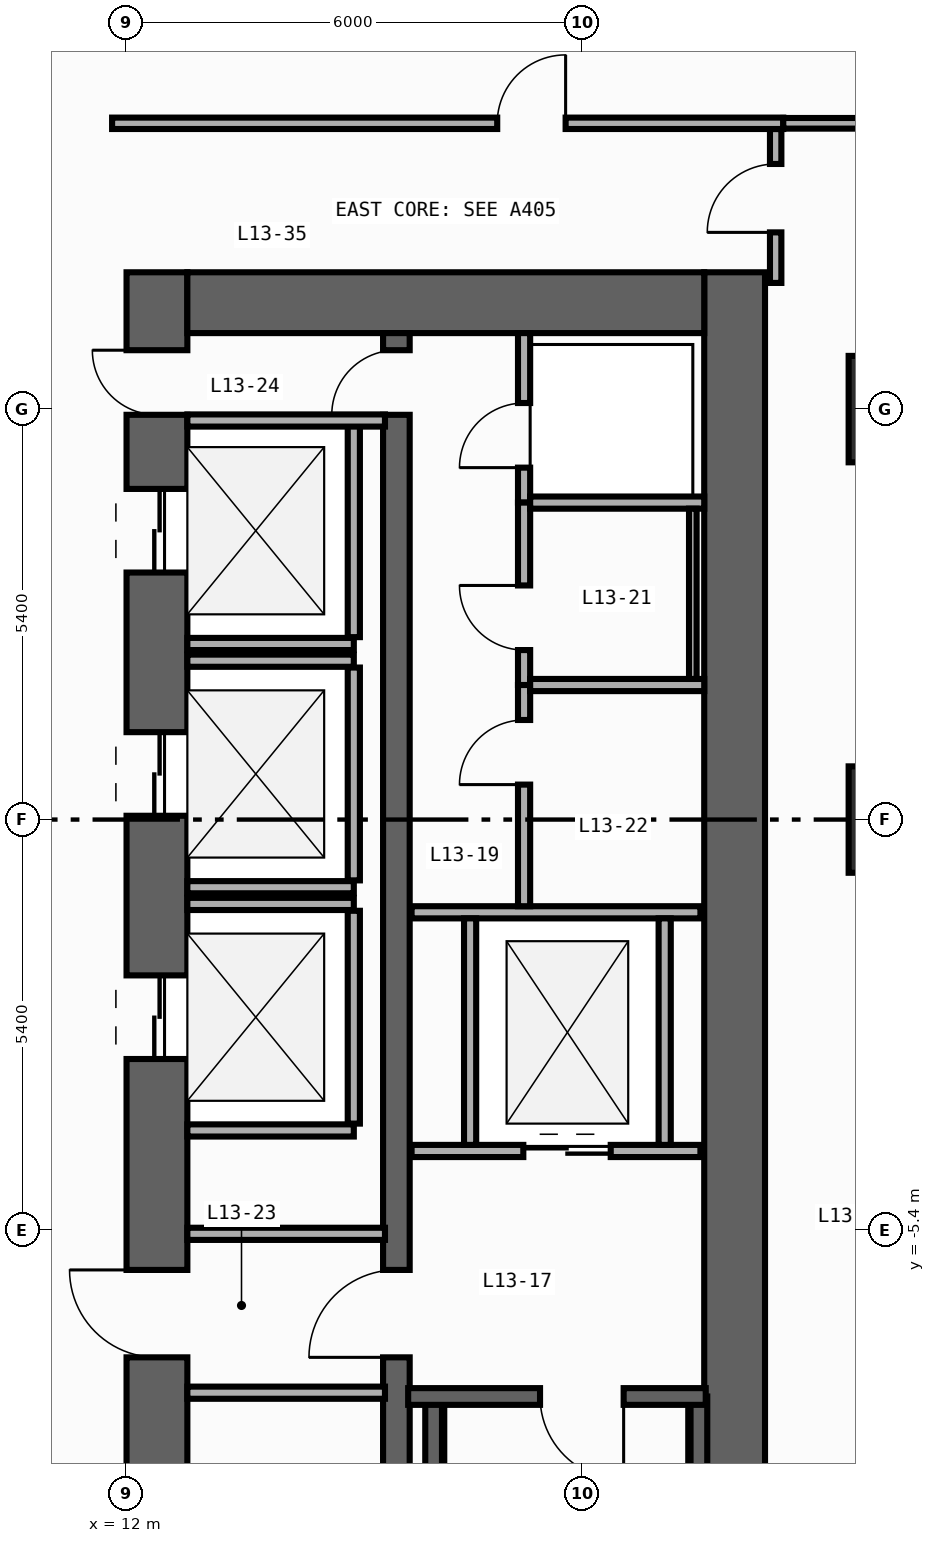
"""IFC4 building model, lengths in metres.
Left out: names, types, materials, properties, quantities, classifications, styles, units other than length and angle.
Written with IfcOpenShell. Run it as: python <this file> out.ifc"""

import sys

from ifc_helpers import new_model, si_unit, direction, frame, frame_2d, origin, origin_2d, place, context, subcontext, project, spatial, rectangle, extrude, element, fill, save


model = new_model("IFC4")
c1 = context("Model", 3, precision=1e-05, world=origin(), true_north=direction((0.0, 1.0)))
c2 = subcontext(c1, "Body", "Model", "MODEL_VIEW")
j1 = project(units=[si_unit("LENGTHUNIT", "METRE"), si_unit("PLANEANGLEUNIT", "RADIAN")], contexts=[c1])
p1 = place(None, origin())
s1 = spatial("IfcSite", under=j1, at=p1, CompositionType="ELEMENT")
p2 = place(p1, origin())
s2 = spatial("IfcBuilding", under=s1, at=p2, CompositionType="ELEMENT")
p3 = place(p2, frame((0.0, 0.0, 55.4)))
s3 = spatial("IfcBuildingStorey", under=s2, at=p3, CompositionType="ELEMENT", Elevation=55.4)
p4 = place(p3, frame((12.4, -19.8, 0.0), z_axis=(0.0, 0.0, 1.0), x_axis=(0.0, 1.0, 0.0)))
e1 = element("IfcWall", 1, at=p4, inside=s3, PredefinedType="SHEAR", context=c2, shape_type="SweptSolid", body=[
    extrude(rectangle(XDim=27.0, YDim=0.8, at=frame_2d((13.5, 0.0))), origin(), (0.0, 0.0, 1.0), 3.94),
])
p5 = place(p4, frame((23.05, 0.0, 0.0)))
e2 = element("IfcOpeningElement", 2, at=p5, cuts=e1, PredefinedType="OPENING", context=c2, shape_type="SweptSolid", body=[
    extrude(rectangle(XDim=1.1, YDim=2.2, at=frame_2d((0.55, 1.1))), frame((0.0, 0.41, 0.0), z_axis=(0.0, -1.0, 0.0), x_axis=(1.0, 0.0, 0.0)), (0.0, 0.0, 1.0), 0.82),
])
p6 = place(p4, frame((19.85, 0.0, 0.0)))
e3 = element("IfcOpeningElement", 3, at=p6, cuts=e1, PredefinedType="OPENING", context=c2, shape_type="SweptSolid", body=[
    extrude(rectangle(XDim=1.1, YDim=2.2, at=frame_2d((0.55, 1.1))), frame((0.0, 0.41, 0.0), z_axis=(0.0, -1.0, 0.0), x_axis=(1.0, 0.0, 0.0)), (0.0, 0.0, 1.0), 0.82),
])
p7 = place(p4, frame((16.65, 0.0, 0.0)))
e4 = element("IfcOpeningElement", 4, at=p7, cuts=e1, PredefinedType="OPENING", context=c2, shape_type="SweptSolid", body=[
    extrude(rectangle(XDim=1.1, YDim=2.2, at=frame_2d((0.55, 1.1))), frame((0.0, 0.41, 0.0), z_axis=(0.0, -1.0, 0.0), x_axis=(1.0, 0.0, 0.0)), (0.0, 0.0, 1.0), 0.82),
])
p8 = place(p4, frame((10.175, 0.0, 0.0)))
e5 = element("IfcOpeningElement", 5, at=p8, cuts=e1, PredefinedType="OPENING", context=c2, shape_type="SweptSolid", body=[
    extrude(rectangle(XDim=0.85, YDim=2.1, at=frame_2d((0.425, 1.05))), frame((0.0, 0.41, 0.0), z_axis=(0.0, -1.0, 0.0), x_axis=(1.0, 0.0, 0.0)), (0.0, 0.0, 1.0), 0.82),
])
p9 = place(p4, frame((12.725, 0.0, 0.0)))
e6 = element("IfcOpeningElement", 6, at=p9, cuts=e1, PredefinedType="OPENING", context=c2, shape_type="SweptSolid", body=[
    extrude(rectangle(XDim=1.15, YDim=2.2, at=frame_2d((0.575, 1.1))), frame((0.0, 0.41, 0.0), z_axis=(0.0, -1.0, 0.0), x_axis=(1.0, 0.0, 0.0)), (0.0, 0.0, 1.0), 0.82),
])
p10 = place(p4, frame((25.125, 0.0, 0.0)))
e7 = element("IfcOpeningElement", 7, at=p10, cuts=e1, PredefinedType="OPENING", context=c2, shape_type="SweptSolid", body=[
    extrude(rectangle(XDim=0.85, YDim=2.1, at=frame_2d((0.425, 1.05))), frame((0.0, 0.41, 0.0), z_axis=(0.0, -1.0, 0.0), x_axis=(1.0, 0.0, 0.0)), (0.0, 0.0, 1.0), 0.82),
])
p11 = place(p3, frame((20.0, -19.8, 0.0), z_axis=(0.0, 0.0, 1.0), x_axis=(0.0, 1.0, 0.0)))
e8 = element("IfcWall", 8, at=p11, inside=s3, PredefinedType="SHEAR", context=c2, shape_type="SweptSolid", body=[
    extrude(rectangle(XDim=27.0, YDim=0.8, at=frame_2d((13.5, 0.0))), origin(), (0.0, 0.0, 1.0), 3.94),
])
p12 = place(p3, frame((12.8, 6.8, 0.0), z_axis=(0.0, 0.0, 1.0), x_axis=(1.0, 0.0, 0.0)))
e9 = element("IfcWall", 9, at=p12, inside=s3, PredefinedType="SHEAR", context=c2, shape_type="SweptSolid", body=[
    extrude(rectangle(XDim=6.8, YDim=0.8, at=frame_2d((3.4, 0.0))), origin(), (0.0, 0.0, 1.0), 3.94),
])
p13 = place(p3, frame((15.55, -19.0, 0.0), z_axis=(0.0, 0.0, 1.0), x_axis=(0.0, 1.0, 0.0)))
e10 = element("IfcWall", 10, at=p13, inside=s3, PredefinedType="SHEAR", context=c2, shape_type="SweptSolid", body=[
    extrude(rectangle(XDim=25.4, YDim=0.35, at=frame_2d((12.7, 0.0))), origin(), (0.0, 0.0, 1.0), 3.94),
])
p14 = place(p13, frame((11.925, 0.0, 0.0)))
e11 = element("IfcOpeningElement", 11, at=p14, cuts=e10, PredefinedType="OPENING", context=c2, shape_type="SweptSolid", body=[
    extrude(rectangle(XDim=1.15, YDim=2.2, at=frame_2d((0.575, 1.1))), frame((0.0, 0.185, 0.0), z_axis=(0.0, -1.0, 0.0), x_axis=(1.0, 0.0, 0.0)), (0.0, 0.0, 1.0), 0.37),
])
p15 = place(p13, frame((24.325, 0.0, 0.0)))
e12 = element("IfcOpeningElement", 12, at=p15, cuts=e10, PredefinedType="OPENING", context=c2, shape_type="SweptSolid", body=[
    extrude(rectangle(XDim=0.85, YDim=2.1, at=frame_2d((0.425, 1.05))), frame((0.0, 0.185, 0.0), z_axis=(0.0, -1.0, 0.0), x_axis=(1.0, 0.0, 0.0)), (0.0, 0.0, 1.0), 0.37),
])
for number, where, z_axis, x_axis in (
    (13, (16.04, -18.89, 0.0), (0.0, 0.0, 1.0), (0.0, 1.0, 0.0)),
    (14, (19.53, -18.89, 0.0), (0.0, 0.0, 1.0), (0.0, 1.0, 0.0)),
):
    element("IfcWall", number, at=place(p3, frame(where, z_axis=z_axis, x_axis=x_axis)), inside=s3, PredefinedType="SHEAR", context=c2, shape_type="SweptSolid", body=[
        extrude(rectangle(XDim=11.3, YDim=0.22, at=frame_2d((5.65, 0.0))), origin(), (0.0, 0.0, 1.0), 3.94),
    ])
p16 = place(p3, frame((19.62, -7.59, 0.0), z_axis=(0.0, 0.0, 1.0), x_axis=(-1.0, 0.0, 0.0)))
e15 = element("IfcWall", 15, at=p16, inside=s3, PredefinedType="SHEAR", context=c2, shape_type="SweptSolid", body=[
    extrude(rectangle(XDim=3.915, YDim=0.22, at=frame_2d((1.958, 0.0))), origin(), (0.0, 0.0, 1.0), 3.94),
])
p17 = place(p16, frame((1.08, 0.0, 0.0)))
e16 = element("IfcOpeningElement", 16, at=p17, cuts=e15, PredefinedType="OPENING", context=c2, shape_type="SweptSolid", body=[
    extrude(rectangle(XDim=1.1, YDim=2.2, at=frame_2d((0.55, 1.1))), frame((0.0, 0.12, 0.0), z_axis=(0.0, -1.0, 0.0), x_axis=(1.0, 0.0, 0.0)), (0.0, 0.0, 1.0), 0.24),
])
for number, where, z_axis, x_axis in (
    (17, (22.2, 0.0, 0.0), (0.0, 0.0, 1.0), (1.0, 0.0, 0.0)),
    (18, (22.2, 5.4, 0.0), (0.0, 0.0, 1.0), (1.0, 0.0, 0.0)),
):
    element("IfcColumn", number, at=place(p3, frame(where, z_axis=z_axis, x_axis=x_axis)), inside=s3, PredefinedType="COLUMN", context=c2, shape_type="SweptSolid", body=[
        extrude(rectangle(XDim=1.4, YDim=1.4, at=origin_2d()), origin(), (0.0, 0.0, 1.0), 4.2),
    ])
p18 = place(p3, frame((12.8, 2.31, 0.0), z_axis=(0.0, 0.0, 1.0), x_axis=(1.0, 0.0, 0.0)))
e19 = element("IfcWall", 19, at=p18, inside=s3, PredefinedType="STANDARD", context=c2, shape_type="SweptSolid", body=[
    extrude(rectangle(XDim=2.19, YDim=0.16, at=frame_2d((1.095, 0.0))), origin(), (0.0, 0.0, 1.0), 3.94),
])
p19 = place(p3, frame((14.99, 2.4, 0.0), z_axis=(0.0, 0.0, 1.0), x_axis=(0.0, 1.0, 0.0)))
e20 = element("IfcWall", 20, at=p19, inside=s3, PredefinedType="STANDARD", context=c2, shape_type="SweptSolid", body=[
    extrude(rectangle(XDim=2.8, YDim=0.16, at=frame_2d((1.4, 0.0))), origin(), (0.0, 0.0, 1.0), 3.94),
])
for number, where, z_axis, x_axis in (
    (21, (12.8, -0.89, 0.0), (0.0, 0.0, 1.0), (1.0, 0.0, 0.0)),
    (22, (12.8, 2.09, 0.0), (0.0, 0.0, 1.0), (1.0, 0.0, 0.0)),
):
    element("IfcWall", number, at=place(p3, frame(where, z_axis=z_axis, x_axis=x_axis)), inside=s3, PredefinedType="STANDARD", context=c2, shape_type="SweptSolid", body=[
        extrude(rectangle(XDim=2.19, YDim=0.16, at=frame_2d((1.095, 0.0))), origin(), (0.0, 0.0, 1.0), 3.94),
    ])
p20 = place(p3, frame((14.99, -0.8, 0.0), z_axis=(0.0, 0.0, 1.0), x_axis=(0.0, 1.0, 0.0)))
e23 = element("IfcWall", 23, at=p20, inside=s3, PredefinedType="STANDARD", context=c2, shape_type="SweptSolid", body=[
    extrude(rectangle(XDim=2.8, YDim=0.16, at=frame_2d((1.4, 0.0))), origin(), (0.0, 0.0, 1.0), 3.94),
])
for number, where, z_axis, x_axis in (
    (24, (12.8, -4.09, 0.0), (0.0, 0.0, 1.0), (1.0, 0.0, 0.0)),
    (25, (12.8, -1.11, 0.0), (0.0, 0.0, 1.0), (1.0, 0.0, 0.0)),
):
    element("IfcWall", number, at=place(p3, frame(where, z_axis=z_axis, x_axis=x_axis)), inside=s3, PredefinedType="STANDARD", context=c2, shape_type="SweptSolid", body=[
        extrude(rectangle(XDim=2.19, YDim=0.16, at=frame_2d((1.095, 0.0))), origin(), (0.0, 0.0, 1.0), 3.94),
    ])
p21 = place(p3, frame((14.99, -4.0, 0.0), z_axis=(0.0, 0.0, 1.0), x_axis=(0.0, 1.0, 0.0)))
e26 = element("IfcWall", 26, at=p21, inside=s3, PredefinedType="STANDARD", context=c2, shape_type="SweptSolid", body=[
    extrude(rectangle(XDim=2.8, YDim=0.16, at=frame_2d((1.4, 0.0))), origin(), (0.0, 0.0, 1.0), 3.94),
])
p22 = place(p3, frame((15.75, -4.36, 0.0), z_axis=(0.0, 0.0, 1.0), x_axis=(1.0, 0.0, 0.0)))
e27 = element("IfcWall", 27, at=p22, inside=s3, PredefinedType="STANDARD", context=c2, shape_type="SweptSolid", body=[
    extrude(rectangle(XDim=3.8, YDim=0.16, at=frame_2d((1.9, 0.0))), origin(), (0.0, 0.0, 1.0), 3.94),
])
p23 = place(p22, frame((1.47, 0.0, 0.0)))
e28 = element("IfcOpeningElement", 28, at=p23, cuts=e27, PredefinedType="OPENING", context=c2, shape_type="SweptSolid", body=[
    extrude(rectangle(XDim=1.15, YDim=2.2, at=frame_2d((0.575, 1.1))), frame((0.0, 0.09, 0.0), z_axis=(0.0, -1.0, 0.0), x_axis=(1.0, 0.0, 0.0)), (0.0, 0.0, 1.0), 0.18),
])
p24 = place(p3, frame((15.75, -1.22, 0.0), z_axis=(0.0, 0.0, 1.0), x_axis=(1.0, 0.0, 0.0)))
e29 = element("IfcWall", 29, at=p24, inside=s3, PredefinedType="STANDARD", context=c2, shape_type="SweptSolid", body=[
    extrude(rectangle(XDim=3.8, YDim=0.16, at=frame_2d((1.9, 0.0))), origin(), (0.0, 0.0, 1.0), 3.94),
])
for number, where, z_axis, x_axis in (
    (30, (16.52, -4.28, 0.0), (0.0, 0.0, 1.0), (0.0, 1.0, 0.0)),
    (31, (19.08, -4.28, 0.0), (0.0, 0.0, 1.0), (0.0, 1.0, 0.0)),
):
    element("IfcWall", number, at=place(p3, frame(where, z_axis=z_axis, x_axis=x_axis)), inside=s3, PredefinedType="STANDARD", context=c2, shape_type="SweptSolid", body=[
        extrude(rectangle(XDim=2.98, YDim=0.16, at=frame_2d((1.49, 0.0))), origin(), (0.0, 0.0, 1.0), 3.94),
    ])
for number, where, z_axis, x_axis in (
    (32, (12.8, -5.45, 0.0), (0.0, 0.0, 1.0), (1.0, 0.0, 0.0)),
    (33, (12.8, -7.54, 0.0), (0.0, 0.0, 1.0), (1.0, 0.0, 0.0)),
    (34, (12.8, 5.25, 0.0), (0.0, 0.0, 1.0), (1.0, 0.0, 0.0)),
):
    element("IfcWall", number, at=place(p3, frame(where, z_axis=z_axis, x_axis=x_axis)), inside=s3, PredefinedType="STANDARD", context=c2, shape_type="SweptSolid", body=[
        extrude(rectangle(XDim=2.6, YDim=0.16, at=frame_2d((1.3, 0.0))), origin(), (0.0, 0.0, 1.0), 3.94),
    ])
p25 = place(p3, frame((17.23, 4.17, 0.0), z_axis=(0.0, 0.0, 1.0), x_axis=(0.0, 1.0, 0.0)))
e35 = element("IfcWall", 35, at=p25, inside=s3, PredefinedType="PARTITIONING", context=c2, shape_type="SweptSolid", body=[
    extrude(rectangle(XDim=2.23, YDim=0.16, at=frame_2d((1.115, 0.0))), origin(), (0.0, 0.0, 1.0), 3.94),
])
p26 = place(p25, frame((0.46, 0.0, 0.0)))
e36 = element("IfcOpeningElement", 36, at=p26, cuts=e35, PredefinedType="OPENING", context=c2, shape_type="SweptSolid", body=[
    extrude(rectangle(XDim=0.85, YDim=2.1, at=frame_2d((0.425, 1.05))), frame((0.0, 0.09, 0.0), z_axis=(0.0, -1.0, 0.0), x_axis=(1.0, 0.0, 0.0)), (0.0, 0.0, 1.0), 0.18),
])
p27 = place(p3, frame((17.23, 1.77, 0.0), z_axis=(0.0, 0.0, 1.0), x_axis=(0.0, 1.0, 0.0)))
e37 = element("IfcWall", 37, at=p27, inside=s3, PredefinedType="PARTITIONING", context=c2, shape_type="SweptSolid", body=[
    extrude(rectangle(XDim=2.4, YDim=0.16, at=frame_2d((1.2, 0.0))), origin(), (0.0, 0.0, 1.0), 3.94),
])
p28 = place(p27, frame((0.46, 0.0, 0.0)))
e38 = element("IfcOpeningElement", 38, at=p28, cuts=e37, PredefinedType="OPENING", context=c2, shape_type="SweptSolid", body=[
    extrude(rectangle(XDim=0.85, YDim=2.1, at=frame_2d((0.425, 1.05))), frame((0.0, 0.09, 0.0), z_axis=(0.0, -1.0, 0.0), x_axis=(1.0, 0.0, 0.0)), (0.0, 0.0, 1.0), 0.18),
])
p29 = place(p3, frame((17.23, -1.14, 0.0), z_axis=(0.0, 0.0, 1.0), x_axis=(0.0, 1.0, 0.0)))
e39 = element("IfcWall", 39, at=p29, inside=s3, PredefinedType="PARTITIONING", context=c2, shape_type="SweptSolid", body=[
    extrude(rectangle(XDim=2.91, YDim=0.16, at=frame_2d((1.455, 0.0))), origin(), (0.0, 0.0, 1.0), 3.94),
])
p30 = place(p29, frame((1.6, 0.0, 0.0)))
e40 = element("IfcOpeningElement", 40, at=p30, cuts=e39, PredefinedType="OPENING", context=c2, shape_type="SweptSolid", body=[
    extrude(rectangle(XDim=0.85, YDim=2.1, at=frame_2d((0.425, 1.05))), frame((0.0, 0.09, 0.0), z_axis=(0.0, -1.0, 0.0), x_axis=(1.0, 0.0, 0.0)), (0.0, 0.0, 1.0), 0.18),
])
for number, where, z_axis, x_axis in (
    (41, (17.31, 4.17, 0.0), (0.0, 0.0, 1.0), (1.0, 0.0, 0.0)),
    (42, (17.31, 1.77, 0.0), (0.0, 0.0, 1.0), (1.0, 0.0, 0.0)),
):
    element("IfcWall", number, at=place(p3, frame(where, z_axis=z_axis, x_axis=x_axis)), inside=s3, PredefinedType="PARTITIONING", context=c2, shape_type="SweptSolid", body=[
        extrude(rectangle(XDim=2.29, YDim=0.16, at=frame_2d((1.145, 0.0))), origin(), (0.0, 0.0, 1.0), 3.94),
    ])
p31 = place(p3, frame((20.54, 7.06, 0.0), z_axis=(0.0, 0.0, 1.0), x_axis=(0.0, 1.0, 0.0)))
e43 = element("IfcWall", 43, at=p31, inside=s3, PredefinedType="PARTITIONING", context=c2, shape_type="SweptSolid", body=[
    extrude(rectangle(XDim=2.025, YDim=0.15, at=frame_2d((1.012, 0.0))), origin(), (0.0, 0.0, 1.0), 3.94),
])
p32 = place(p31, frame((0.665, 0.0, 0.0)))
e44 = element("IfcOpeningElement", 44, at=p32, cuts=e43, PredefinedType="OPENING", context=c2, shape_type="SweptSolid", body=[
    extrude(rectangle(XDim=0.9, YDim=2.15, at=frame_2d((0.45, 1.075))), frame((0.0, 0.085, 0.0), z_axis=(0.0, -1.0, 0.0), x_axis=(1.0, 0.0, 0.0)), (0.0, 0.0, 1.0), 0.17),
])
p33 = place(p3, frame((11.81, 9.16, 0.0), z_axis=(0.0, 0.0, 1.0), x_axis=(1.0, 0.0, 0.0)))
e45 = element("IfcWall", 45, at=p33, inside=s3, PredefinedType="PARTITIONING", context=c2, shape_type="SweptSolid", body=[
    extrude(rectangle(XDim=8.83, YDim=0.15, at=frame_2d((4.415, 0.0))), origin(), (0.0, 0.0, 1.0), 3.94),
])
p34 = place(p33, frame((5.067, 0.0, 0.0)))
e46 = element("IfcOpeningElement", 46, at=p34, cuts=e45, PredefinedType="OPENING", context=c2, shape_type="SweptSolid", body=[
    extrude(rectangle(XDim=0.9, YDim=2.15, at=frame_2d((0.45, 1.075))), frame((0.0, 0.085, 0.0), z_axis=(0.0, -1.0, 0.0), x_axis=(1.0, 0.0, 0.0)), (0.0, 0.0, 1.0), 0.17),
])
p35 = place(p3, frame((20.64, 9.16, 0.0), z_axis=(0.0, 0.0, 1.0), x_axis=(1.0, 0.0, 0.0)))
e47 = element("IfcWall", 47, at=p35, inside=s3, PredefinedType="PARTITIONING", context=c2, shape_type="SweptSolid", body=[
    extrude(rectangle(XDim=3.415, YDim=0.14, at=frame_2d((1.708, 0.0))), origin(), (0.0, 0.0, 1.0), 3.94),
])
p36 = place(p3, frame((19.45, 4.09, 0.0), z_axis=(0.0, 0.0, 1.0), x_axis=(0.0, -1.0, 0.0)))
e48 = element("IfcWall", 48, at=p36, inside=s3, PredefinedType="PARTITIONING", context=c2, shape_type="SweptSolid", body=[
    extrude(rectangle(XDim=2.24, YDim=0.1, at=frame_2d((1.12, 0.0))), origin(), (0.0, 0.0, 1.0), 3.94),
])
p37 = place(p17, origin())
e49 = element("IfcDoor", 49, at=p37, inside=s3, OperationType="SINGLE_SWING_LEFT", PredefinedType="DOOR", context=c2, shape_type="SweptSolid", body=[
    extrude(rectangle(XDim=1.1, YDim=2.2, at=frame_2d((0.55, 1.1))), frame((0.0, 0.025, 0.0), z_axis=(0.0, -1.0, 0.0), x_axis=(1.0, 0.0, 0.0)), (0.0, 0.0, 1.0), 0.05),
])
fill(e16, e49)
p38 = place(p5, origin())
e50 = element("IfcDoor", 50, at=p38, inside=s3, OperationType="DOUBLE_DOOR_SLIDING", PredefinedType="DOOR", context=c2, shape_type="SweptSolid", body=[
    extrude(rectangle(XDim=1.1, YDim=2.2, at=frame_2d((0.55, 1.1))), frame((0.0, 0.025, 0.0), z_axis=(0.0, -1.0, 0.0), x_axis=(1.0, 0.0, 0.0)), (0.0, 0.0, 1.0), 0.05),
])
fill(e2, e50)
p39 = place(p6, origin())
e51 = element("IfcDoor", 51, at=p39, inside=s3, OperationType="DOUBLE_DOOR_SLIDING", PredefinedType="DOOR", context=c2, shape_type="SweptSolid", body=[
    extrude(rectangle(XDim=1.1, YDim=2.2, at=frame_2d((0.55, 1.1))), frame((0.0, 0.025, 0.0), z_axis=(0.0, -1.0, 0.0), x_axis=(1.0, 0.0, 0.0)), (0.0, 0.0, 1.0), 0.05),
])
fill(e3, e51)
p40 = place(p7, origin())
e52 = element("IfcDoor", 52, at=p40, inside=s3, OperationType="DOUBLE_DOOR_SLIDING", PredefinedType="DOOR", context=c2, shape_type="SweptSolid", body=[
    extrude(rectangle(XDim=1.1, YDim=2.2, at=frame_2d((0.55, 1.1))), frame((0.0, 0.025, 0.0), z_axis=(0.0, -1.0, 0.0), x_axis=(1.0, 0.0, 0.0)), (0.0, 0.0, 1.0), 0.05),
])
fill(e4, e52)
p41 = place(p9, origin())
e53 = element("IfcDoor", 53, at=p41, inside=s3, OperationType="SINGLE_SWING_RIGHT", PredefinedType="DOOR", context=c2, shape_type="SweptSolid", body=[
    extrude(rectangle(XDim=1.15, YDim=2.2, at=frame_2d((0.575, 1.1))), frame((0.0, 0.025, 0.0), z_axis=(0.0, -1.0, 0.0), x_axis=(1.0, 0.0, 0.0)), (0.0, 0.0, 1.0), 0.05),
])
fill(e6, e53)
p42 = place(p14, origin())
e54 = element("IfcDoor", 54, at=p42, inside=s3, OperationType="SINGLE_SWING_LEFT", PredefinedType="DOOR", context=c2, shape_type="SweptSolid", body=[
    extrude(rectangle(XDim=1.15, YDim=2.2, at=frame_2d((0.575, 1.1))), frame((0.0, 0.025, 0.0), z_axis=(0.0, -1.0, 0.0), x_axis=(1.0, 0.0, 0.0)), (0.0, 0.0, 1.0), 0.05),
])
fill(e11, e54)
p43 = place(p10, origin())
e55 = element("IfcDoor", 55, at=p43, inside=s3, OperationType="SINGLE_SWING_RIGHT", PredefinedType="DOOR", context=c2, shape_type="SweptSolid", body=[
    extrude(rectangle(XDim=0.85, YDim=2.1, at=frame_2d((0.425, 1.05))), frame((0.0, 0.025, 0.0), z_axis=(0.0, -1.0, 0.0), x_axis=(1.0, 0.0, 0.0)), (0.0, 0.0, 1.0), 0.05),
])
fill(e7, e55)
p44 = place(p15, origin())
e56 = element("IfcDoor", 56, at=p44, inside=s3, OperationType="SINGLE_SWING_LEFT", PredefinedType="DOOR", context=c2, shape_type="SweptSolid", body=[
    extrude(rectangle(XDim=0.85, YDim=2.1, at=frame_2d((0.425, 1.05))), frame((0.0, 0.025, 0.0), z_axis=(0.0, -1.0, 0.0), x_axis=(1.0, 0.0, 0.0)), (0.0, 0.0, 1.0), 0.05),
])
fill(e12, e56)
p45 = place(p23, origin())
e57 = element("IfcDoor", 57, at=p45, inside=s3, OperationType="DOUBLE_DOOR_SLIDING", PredefinedType="DOOR", context=c2, shape_type="SweptSolid", body=[
    extrude(rectangle(XDim=1.15, YDim=2.2, at=frame_2d((0.575, 1.1))), frame((0.0, 0.025, 0.0), z_axis=(0.0, -1.0, 0.0), x_axis=(1.0, 0.0, 0.0)), (0.0, 0.0, 1.0), 0.05),
])
fill(e28, e57)
p46 = place(p26, origin())
e58 = element("IfcDoor", 58, at=p46, inside=s3, OperationType="SINGLE_SWING_LEFT", PredefinedType="DOOR", context=c2, shape_type="SweptSolid", body=[
    extrude(rectangle(XDim=0.85, YDim=2.1, at=frame_2d((0.425, 1.05))), frame((0.0, 0.025, 0.0), z_axis=(0.0, -1.0, 0.0), x_axis=(1.0, 0.0, 0.0)), (0.0, 0.0, 1.0), 0.05),
])
fill(e36, e58)
p47 = place(p28, origin())
e59 = element("IfcDoor", 59, at=p47, inside=s3, OperationType="SINGLE_SWING_RIGHT", PredefinedType="DOOR", context=c2, shape_type="SweptSolid", body=[
    extrude(rectangle(XDim=0.85, YDim=2.1, at=frame_2d((0.425, 1.05))), frame((0.0, 0.025, 0.0), z_axis=(0.0, -1.0, 0.0), x_axis=(1.0, 0.0, 0.0)), (0.0, 0.0, 1.0), 0.05),
])
fill(e38, e59)
p48 = place(p30, origin())
e60 = element("IfcDoor", 60, at=p48, inside=s3, OperationType="SINGLE_SWING_LEFT", PredefinedType="DOOR", context=c2, shape_type="SweptSolid", body=[
    extrude(rectangle(XDim=0.85, YDim=2.1, at=frame_2d((0.425, 1.05))), frame((0.0, 0.025, 0.0), z_axis=(0.0, -1.0, 0.0), x_axis=(1.0, 0.0, 0.0)), (0.0, 0.0, 1.0), 0.05),
])
fill(e40, e60)
p49 = place(p32, origin())
e61 = element("IfcDoor", 61, at=p49, inside=s3, OperationType="SINGLE_SWING_LEFT", PredefinedType="DOOR", context=c2, shape_type="SweptSolid", body=[
    extrude(rectangle(XDim=0.9, YDim=2.15, at=frame_2d((0.45, 1.075))), frame((0.0, 0.025, 0.0), z_axis=(0.0, -1.0, 0.0), x_axis=(1.0, 0.0, 0.0)), (0.0, 0.0, 1.0), 0.05),
])
fill(e44, e61)
p50 = place(p34, origin())
e62 = element("IfcDoor", 62, at=p50, inside=s3, OperationType="SINGLE_SWING_RIGHT", PredefinedType="DOOR", context=c2, shape_type="SweptSolid", body=[
    extrude(rectangle(XDim=0.9, YDim=2.15, at=frame_2d((0.45, 1.075))), frame((0.0, 0.025, 0.0), z_axis=(0.0, -1.0, 0.0), x_axis=(1.0, 0.0, 0.0)), (0.0, 0.0, 1.0), 0.05),
])
fill(e46, e62)
save(model, sys.argv[1])
